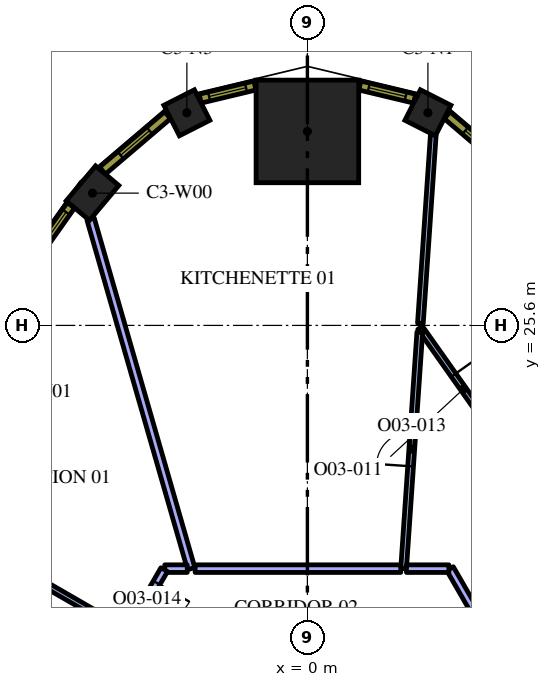
"""IFC4 building model, lengths in metres.
Left out: names, types, materials, properties, quantities, classifications, styles, units other than length and angle.
Written with IfcOpenShell. Run it as: python <this file> out.ifc"""

import sys

from ifc_helpers import new_model, si_unit, direction, frame, frame_2d, origin, origin_2d, place, context, subcontext, project, spatial, rectangle, extrude, element, fill, save


model = new_model("IFC4")
c1 = context("Model", 3, precision=1e-05, world=origin(), true_north=direction((0.0, 1.0)))
c2 = subcontext(c1, "Body", "Model", "MODEL_VIEW")
j1 = project(units=[si_unit("LENGTHUNIT", "METRE"), si_unit("PLANEANGLEUNIT", "RADIAN")], contexts=[c1])
p1 = place(None, origin())
s1 = spatial("IfcSite", under=j1, at=p1, CompositionType="ELEMENT")
p2 = place(p1, origin())
s2 = spatial("IfcBuilding", under=s1, at=p2, CompositionType="ELEMENT")
p3 = place(p2, frame((0.0, 0.0, 175.2)))
s3 = spatial("IfcBuildingStorey", under=s2, at=p3, CompositionType="ELEMENT", Elevation=175.2)
p4 = place(p3, frame((0.0, 30.704, 0.0), z_axis=(0.0, 0.0, 1.0), x_axis=(0.0, 1.0, 0.0)))
e1 = element("IfcColumn", 1, at=p4, inside=s3, PredefinedType="COLUMN", context=c2, shape_type="SweptSolid", body=[
    extrude(rectangle(XDim=2.7, YDim=2.7, at=origin_2d()), origin(), (0.0, 0.0, 1.0), 4.2),
])
for number, where, z_axis, x_axis in (
    (2, (3.171, 31.195, 0.0), (0.0, 0.0, 1.0), (-0.891, 0.453, 0.0)),
    (3, (-3.171, 31.195, 0.0), (0.0, 0.0, 1.0), (-0.891, -0.453, 0.0)),
):
    element("IfcColumn", number, at=place(p3, frame(where, z_axis=z_axis, x_axis=x_axis)), inside=s3, PredefinedType="COLUMN", context=c2, shape_type="SweptSolid", body=[
        extrude(rectangle(XDim=0.9, YDim=0.9, at=origin_2d()), origin(), (0.0, 0.0, 1.0), 4.2),
    ])
p5 = place(p3, frame((-5.654, 29.081, 0.0), z_axis=(0.0, 0.0, 1.0), x_axis=(-0.643827202606, -0.765170917629, 0.0)))
e4 = element("IfcColumn", 4, at=p5, inside=s3, PredefinedType="COLUMN", context=c2, shape_type="SweptSolid", body=[
    extrude(rectangle(XDim=1.2, YDim=0.8, at=origin_2d()), origin(), (0.0, 0.0, 1.0), 4.2),
])
p6 = place(p3, frame((2.966, 25.539, 0.0), z_axis=(0.0, 0.0, 1.0), x_axis=(0.577099839594, -0.816673603798, 0.0)))
e5 = element("IfcWall", 5, at=p6, inside=s3, PredefinedType="PARTITIONING", context=c2, shape_type="SweptSolid", body=[
    extrude(rectangle(XDim=4.025, YDim=0.15, at=frame_2d((2.013, 0.0))), origin(), (0.0, 0.0, 1.0), 3.15),
])
p7 = place(p6, frame((1.525, 0.0, 0.0)))
e6 = element("IfcOpeningElement", 6, at=p7, cuts=e5, PredefinedType="OPENING", context=c2, shape_type="SweptSolid", body=[
    extrude(rectangle(XDim=0.9, YDim=2.1, at=frame_2d((0.45, 1.05))), frame((0.0, 0.085, 0.0), z_axis=(0.0, -1.0, 0.0), x_axis=(1.0, 0.0, 0.0)), (0.0, 0.0, 1.0), 0.17),
])
p8 = place(p3, frame((2.974, 25.657, 0.0), z_axis=(0.0, 0.0, 1.0), x_axis=(0.068301586051, 0.997664719905, 0.0)))
e7 = element("IfcWall", 7, at=p8, inside=s3, PredefinedType="PARTITIONING", context=c2, shape_type="SweptSolid", body=[
    extrude(rectangle(XDim=4.972, YDim=0.15, at=frame_2d((2.486, 0.0))), origin(), (0.0, 0.0, 1.0), 3.15),
])
p9 = place(p3, frame((2.531, 19.2, 0.0), z_axis=(0.0, 0.0, 1.0), x_axis=(0.06832771358, 0.997662930832, 0.0)))
e8 = element("IfcWall", 8, at=p9, inside=s3, PredefinedType="PARTITIONING", context=c2, shape_type="SweptSolid", body=[
    extrude(rectangle(XDim=6.235, YDim=0.15, at=frame_2d((3.118, 0.0))), origin(), (0.0, 0.0, 1.0), 3.15),
])
p10 = place(p9, frame((2.7, 0.0, 0.0)))
e9 = element("IfcOpeningElement", 9, at=p10, cuts=e8, PredefinedType="OPENING", context=c2, shape_type="SweptSolid", body=[
    extrude(rectangle(XDim=0.9, YDim=2.1, at=frame_2d((0.45, 1.05))), frame((0.0, 0.085, 0.0), z_axis=(0.0, -1.0, 0.0), x_axis=(1.0, 0.0, 0.0)), (0.0, 0.0, 1.0), 0.17),
])
p11 = place(p3, frame((7.872, 12.064, 0.0), z_axis=(0.0, 0.0, 1.0), x_axis=(-0.499995192696, 0.866028179265, 0.0)))
e10 = element("IfcWall", 10, at=p11, inside=s3, PredefinedType="PARTITIONING", context=c2, shape_type="SweptSolid", body=[
    extrude(rectangle(XDim=8.239, YDim=0.2, at=frame_2d((4.12, 0.0))), origin(), (0.0, 0.0, 1.0), 3.15),
])
p12 = place(p11, frame((3.6, 0.0, 0.0)))
e11 = element("IfcOpeningElement", 11, at=p12, cuts=e10, PredefinedType="OPENING", context=c2, shape_type="SweptSolid", body=[
    extrude(rectangle(XDim=1.0, YDim=2.1, at=frame_2d((0.5, 1.05))), frame((0.0, 0.11, 0.0), z_axis=(0.0, -1.0, 0.0), x_axis=(1.0, 0.0, 0.0)), (0.0, 0.0, 1.0), 0.22),
])
p13 = place(p3, frame((3.723, 19.2, 0.0), z_axis=(0.0, 0.0, 1.0), x_axis=(-1.0, 0.0, 0.0)))
e12 = element("IfcWall", 12, at=p13, inside=s3, PredefinedType="PARTITIONING", context=c2, shape_type="SweptSolid", body=[
    extrude(rectangle(XDim=1.116, YDim=0.2, at=frame_2d((0.558, 0.0))), origin(), (0.0, 0.0, 1.0), 3.15),
])
p14 = place(p3, frame((-3.058, 19.2, 0.0), z_axis=(0.0, 0.0, 1.0), x_axis=(-0.276542988003, 0.961001548275, 0.0)))
e13 = element("IfcWall", 13, at=p14, inside=s3, PredefinedType="PARTITIONING", context=c2, shape_type="SweptSolid", body=[
    extrude(rectangle(XDim=9.573, YDim=0.2, at=frame_2d((4.786, 0.0))), origin(), (0.0, 0.0, 1.0), 3.15),
])
p15 = place(p3, frame((2.456, 19.2, 0.0), z_axis=(0.0, 0.0, 1.0), x_axis=(-1.0, 0.0, 0.0)))
e14 = element("IfcWall", 14, at=p15, inside=s3, PredefinedType="PARTITIONING", context=c2, shape_type="SweptSolid", body=[
    extrude(rectangle(XDim=5.41, YDim=0.2, at=frame_2d((2.705, 0.0))), origin(), (0.0, 0.0, 1.0), 3.15),
])
p16 = place(p3, frame((-4.719, 17.526, 0.0), z_axis=(0.0, 0.0, 1.0), x_axis=(-0.866011075544, 0.500024816419, 0.0)))
e15 = element("IfcWall", 15, at=p16, inside=s3, PredefinedType="PARTITIONING", context=c2, shape_type="SweptSolid", body=[
    extrude(rectangle(XDim=3.122, YDim=0.15, at=frame_2d((1.561, 0.0))), origin(), (0.0, 0.0, 1.0), 3.15),
])
p17 = place(p3, frame((-3.162, 19.2, 0.0), z_axis=(0.0, 0.0, 1.0), x_axis=(-1.0, 0.0, 0.0)))
e16 = element("IfcWall", 16, at=p17, inside=s3, PredefinedType="PARTITIONING", context=c2, shape_type="SweptSolid", body=[
    extrude(rectangle(XDim=0.591, YDim=0.2, at=frame_2d((0.295, 0.0))), origin(), (0.0, 0.0, 1.0), 3.15),
])
p18 = place(p3, frame((-3.768, 19.174, 0.0), z_axis=(0.0, 0.0, 1.0), x_axis=(-0.499930512259, -0.866065518833, 0.0)))
e17 = element("IfcWall", 17, at=p18, inside=s3, PredefinedType="PARTITIONING", context=c2, shape_type="SweptSolid", body=[
    extrude(rectangle(XDim=1.828, YDim=0.2, at=frame_2d((0.914, 0.0))), origin(), (0.0, 0.0, 1.0), 3.15),
])
p19 = place(p18, frame((0.4, 0.0, 0.0)))
e18 = element("IfcOpeningElement", 18, at=p19, cuts=e17, PredefinedType="OPENING", context=c2, shape_type="SweptSolid", body=[
    extrude(rectangle(XDim=1.0, YDim=2.1, at=frame_2d((0.5, 1.05))), frame((0.0, 0.11, 0.0), z_axis=(0.0, -1.0, 0.0), x_axis=(1.0, 0.0, 0.0)), (0.0, 0.0, 1.0), 0.22),
])
p20 = place(p3, frame((5.392, 29.672, 0.0), z_axis=(0.0, 0.0, 1.0), x_axis=(-0.761419744247, 0.648259186645, 0.0)))
e19 = element("IfcWall", 19, at=p20, inside=s3, PredefinedType="SOLIDWALL", context=c2, shape_type="SweptSolid", body=[
    extrude(rectangle(XDim=2.25, YDim=0.24, at=frame_2d((1.125, 0.0))), origin(), (0.0, 0.0, 1.0), 3.95),
])
p21 = place(p20, frame((0.625, 0.0, 0.9)))
e20 = element("IfcOpeningElement", 20, at=p21, cuts=e19, PredefinedType="OPENING", context=c2, shape_type="SweptSolid", body=[
    extrude(rectangle(XDim=1.0, YDim=2.55, at=frame_2d((0.5, 1.275))), frame((0.0, 0.13, 0.0), z_axis=(0.0, -1.0, 0.0), x_axis=(1.0, 0.0, 0.0)), (0.0, 0.0, 1.0), 0.26),
])
p22 = place(p3, frame((2.821, 31.566, 0.0), z_axis=(0.0, 0.0, 1.0), x_axis=(-0.972479955788, 0.232986556673, 0.0)))
e21 = element("IfcWall", 21, at=p22, inside=s3, PredefinedType="SOLIDWALL", context=c2, shape_type="SweptSolid", body=[
    extrude(rectangle(XDim=1.482, YDim=0.24, at=frame_2d((0.741, 0.0))), origin(), (0.0, 0.0, 1.0), 3.95),
])
p23 = place(p22, frame((0.241, 0.0, 0.9)))
e22 = element("IfcOpeningElement", 22, at=p23, cuts=e21, PredefinedType="OPENING", context=c2, shape_type="SweptSolid", body=[
    extrude(rectangle(XDim=1.0, YDim=2.55, at=frame_2d((0.5, 1.275))), frame((0.0, 0.13, 0.0), z_axis=(0.0, -1.0, 0.0), x_axis=(1.0, 0.0, 0.0)), (0.0, 0.0, 1.0), 0.26),
])
p24 = place(p3, frame((-1.38, 31.912, 0.0), z_axis=(0.0, 0.0, 1.0), x_axis=(-0.972479955788, -0.232986556673, 0.0)))
e23 = element("IfcWall", 23, at=p24, inside=s3, PredefinedType="SOLIDWALL", context=c2, shape_type="SweptSolid", body=[
    extrude(rectangle(XDim=1.482, YDim=0.24, at=frame_2d((0.741, 0.0))), origin(), (0.0, 0.0, 1.0), 3.95),
])
p25 = place(p24, frame((0.241, 0.0, 0.9)))
e24 = element("IfcOpeningElement", 24, at=p25, cuts=e23, PredefinedType="OPENING", context=c2, shape_type="SweptSolid", body=[
    extrude(rectangle(XDim=1.0, YDim=2.55, at=frame_2d((0.5, 1.275))), frame((0.0, 0.13, 0.0), z_axis=(0.0, -1.0, 0.0), x_axis=(1.0, 0.0, 0.0)), (0.0, 0.0, 1.0), 0.26),
])
p26 = place(p3, frame((-3.678, 31.131, 0.0), z_axis=(0.0, 0.0, 1.0), x_axis=(-0.761419744247, -0.648259186645, 0.0)))
e25 = element("IfcWall", 25, at=p26, inside=s3, PredefinedType="SOLIDWALL", context=c2, shape_type="SweptSolid", body=[
    extrude(rectangle(XDim=2.25, YDim=0.24, at=frame_2d((1.125, 0.0))), origin(), (0.0, 0.0, 1.0), 3.95),
])
p27 = place(p26, frame((0.625, 0.0, 0.9)))
e26 = element("IfcOpeningElement", 26, at=p27, cuts=e25, PredefinedType="OPENING", context=c2, shape_type="SweptSolid", body=[
    extrude(rectangle(XDim=1.0, YDim=2.55, at=frame_2d((0.5, 1.275))), frame((0.0, 0.13, 0.0), z_axis=(0.0, -1.0, 0.0), x_axis=(1.0, 0.0, 0.0)), (0.0, 0.0, 1.0), 0.26),
])
p28 = place(p3, frame((-6.223, 28.762, 0.0), z_axis=(0.0, 0.0, 1.0), x_axis=(-0.577115207679, -0.816662743772, 0.0)))
e27 = element("IfcWall", 27, at=p28, inside=s3, PredefinedType="SOLIDWALL", context=c2, shape_type="SweptSolid", body=[
    extrude(rectangle(XDim=5.213, YDim=0.24, at=frame_2d((2.606, 0.0))), origin(), (0.0, 0.0, 1.0), 3.95),
])
p29 = place(p28, frame((0.221, 0.0, 0.9)))
e28 = element("IfcOpeningElement", 28, at=p29, cuts=e27, PredefinedType="OPENING", context=c2, shape_type="SweptSolid", body=[
    extrude(rectangle(XDim=1.5, YDim=2.55, at=frame_2d((0.75, 1.275))), frame((0.0, 0.13, 0.0), z_axis=(0.0, -1.0, 0.0), x_axis=(1.0, 0.0, 0.0)), (0.0, 0.0, 1.0), 0.26),
])
p30 = place(p28, frame((3.452, 0.0, 0.9)))
e29 = element("IfcOpeningElement", 29, at=p30, cuts=e27, PredefinedType="OPENING", context=c2, shape_type="SweptSolid", body=[
    extrude(rectangle(XDim=1.5, YDim=2.55, at=frame_2d((0.75, 1.275))), frame((0.0, 0.13, 0.0), z_axis=(0.0, -1.0, 0.0), x_axis=(1.0, 0.0, 0.0)), (0.0, 0.0, 1.0), 0.26),
])
p31 = place(p7, origin())
e30 = element("IfcDoor", 30, at=p31, inside=s3, OperationType="SINGLE_SWING_LEFT", PredefinedType="DOOR", context=c2, shape_type="SweptSolid", body=[
    extrude(rectangle(XDim=0.9, YDim=2.1, at=frame_2d((0.45, 1.05))), frame((0.0, 0.025, 0.0), z_axis=(0.0, -1.0, 0.0), x_axis=(1.0, 0.0, 0.0)), (0.0, 0.0, 1.0), 0.05),
])
fill(e6, e30)
p32 = place(p10, origin())
e31 = element("IfcDoor", 31, at=p32, inside=s3, OperationType="SINGLE_SWING_RIGHT", PredefinedType="DOOR", context=c2, shape_type="SweptSolid", body=[
    extrude(rectangle(XDim=0.9, YDim=2.1, at=frame_2d((0.45, 1.05))), frame((0.0, 0.025, 0.0), z_axis=(0.0, -1.0, 0.0), x_axis=(1.0, 0.0, 0.0)), (0.0, 0.0, 1.0), 0.05),
])
fill(e9, e31)
p33 = place(p19, origin())
e32 = element("IfcDoor", 32, at=p33, inside=s3, OperationType="SINGLE_SWING_LEFT", PredefinedType="DOOR", context=c2, shape_type="SweptSolid", body=[
    extrude(rectangle(XDim=1.0, YDim=2.1, at=frame_2d((0.5, 1.05))), frame((0.0, 0.025, 0.0), z_axis=(0.0, -1.0, 0.0), x_axis=(1.0, 0.0, 0.0)), (0.0, 0.0, 1.0), 0.05),
])
fill(e18, e32)
p34 = place(p21, origin())
e33 = element("IfcWindow", 33, at=p34, inside=s3, PartitioningType="SINGLE_PANEL", PredefinedType="WINDOW", context=c2, shape_type="SweptSolid", body=[
    extrude(rectangle(XDim=1.0, YDim=2.55, at=frame_2d((0.5, 1.275))), frame((0.0, 0.04, 0.0), z_axis=(0.0, -1.0, 0.0), x_axis=(1.0, 0.0, 0.0)), (0.0, 0.0, 1.0), 0.06),
])
fill(e20, e33)
p35 = place(p23, origin())
e34 = element("IfcWindow", 34, at=p35, inside=s3, PartitioningType="SINGLE_PANEL", PredefinedType="WINDOW", context=c2, shape_type="SweptSolid", body=[
    extrude(rectangle(XDim=1.0, YDim=2.55, at=frame_2d((0.5, 1.275))), frame((0.0, 0.04, 0.0), z_axis=(0.0, -1.0, 0.0), x_axis=(1.0, 0.0, 0.0)), (0.0, 0.0, 1.0), 0.06),
])
fill(e22, e34)
p36 = place(p25, origin())
e35 = element("IfcWindow", 35, at=p36, inside=s3, PartitioningType="SINGLE_PANEL", PredefinedType="WINDOW", context=c2, shape_type="SweptSolid", body=[
    extrude(rectangle(XDim=1.0, YDim=2.55, at=frame_2d((0.5, 1.275))), frame((0.0, 0.04, 0.0), z_axis=(0.0, -1.0, 0.0), x_axis=(1.0, 0.0, 0.0)), (0.0, 0.0, 1.0), 0.06),
])
fill(e24, e35)
p37 = place(p27, origin())
e36 = element("IfcWindow", 36, at=p37, inside=s3, PartitioningType="SINGLE_PANEL", PredefinedType="WINDOW", context=c2, shape_type="SweptSolid", body=[
    extrude(rectangle(XDim=1.0, YDim=2.55, at=frame_2d((0.5, 1.275))), frame((0.0, 0.04, 0.0), z_axis=(0.0, -1.0, 0.0), x_axis=(1.0, 0.0, 0.0)), (0.0, 0.0, 1.0), 0.06),
])
fill(e26, e36)
p38 = place(p29, origin())
e37 = element("IfcWindow", 37, at=p38, inside=s3, PartitioningType="SINGLE_PANEL", PredefinedType="WINDOW", context=c2, shape_type="SweptSolid", body=[
    extrude(rectangle(XDim=1.5, YDim=2.55, at=frame_2d((0.75, 1.275))), frame((0.0, 0.04, 0.0), z_axis=(0.0, -1.0, 0.0), x_axis=(1.0, 0.0, 0.0)), (0.0, 0.0, 1.0), 0.06),
])
fill(e28, e37)
save(model, sys.argv[1])
